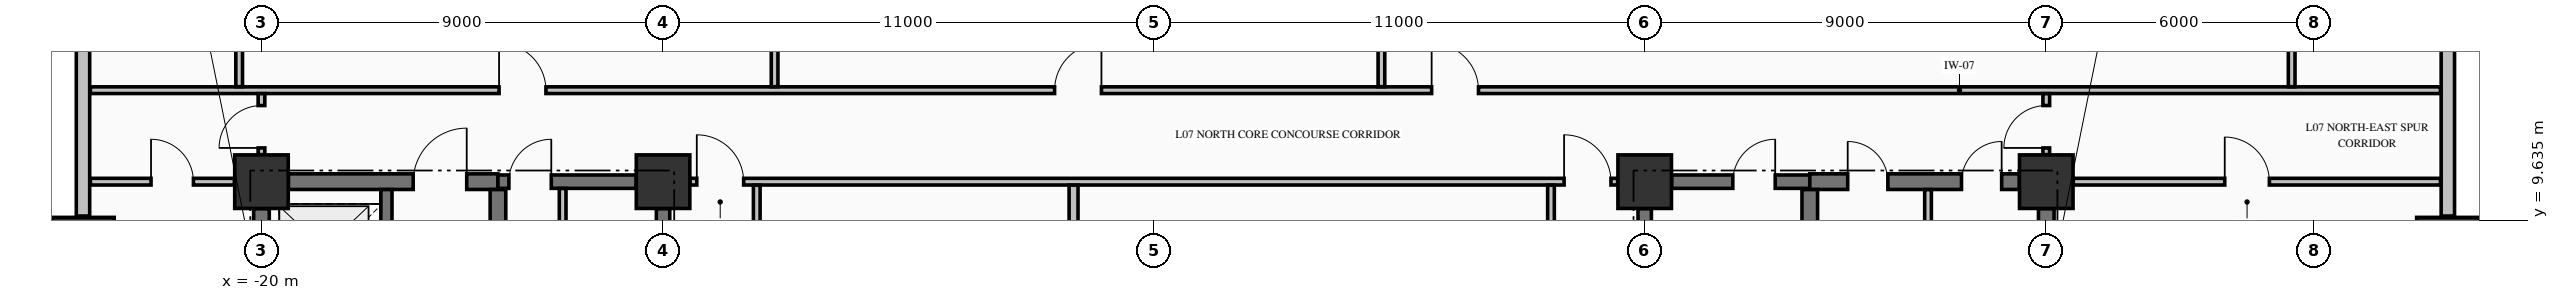
"""IFC4 building model, lengths in metres.
Left out: names, types, materials, properties, quantities, classifications, styles, units other than length and angle.
Written with IfcOpenShell. Run it as: python <this file> out.ifc"""

import sys

from ifc_helpers import new_model, si_unit, direction, frame, frame_2d, origin, origin_2d, place, context, subcontext, project, spatial, rectangle, extrude, element, fill, save


model = new_model("IFC4")
c1 = context("Model", 3, precision=1e-05, world=origin(), true_north=direction((0.0, 1.0)))
c2 = subcontext(c1, "Body", "Model", "MODEL_VIEW")
j1 = project(units=[si_unit("LENGTHUNIT", "METRE"), si_unit("PLANEANGLEUNIT", "RADIAN")], contexts=[c1])
p1 = place(None, origin())
s1 = spatial("IfcSite", under=j1, at=p1, CompositionType="ELEMENT")
p2 = place(p1, origin())
s2 = spatial("IfcBuilding", under=s1, at=p2, CompositionType="ELEMENT")
p3 = place(p2, frame((0.0, 0.0, 34.34)))
s3 = spatial("IfcBuildingStorey", under=s2, at=p3, CompositionType="ELEMENT", Elevation=34.34)
for number, where, z_axis, x_axis in (
    (1, (-24.0, 9.0, -0.3), (0.0, 0.0, 1.0), (1.0, 0.0, 0.0)),
    (2, (29.0, 9.0, -0.3), (0.0, 0.0, 1.0), (1.0, 0.0, 0.0)),
):
    element("IfcColumn", number, at=place(p3, frame(where, z_axis=z_axis, x_axis=x_axis)), inside=s3, PredefinedType="COLUMN", context=c2, shape_type="SweptSolid", body=[
        extrude(rectangle(XDim=1.4, YDim=1.4, at=origin_2d()), origin(), (0.0, 0.0, 1.0), 3.62),
    ])
for number, where, z_axis, x_axis in (
    (3, (-20.0, 10.5, -0.3), (0.0, 0.0, 1.0), (1.0, 0.0, 0.0)),
    (4, (-11.0, 10.5, -0.3), (0.0, 0.0, 1.0), (1.0, 0.0, 0.0)),
    (5, (11.0, 10.5, -0.3), (0.0, 0.0, 1.0), (1.0, 0.0, 0.0)),
    (6, (20.0, 10.5, -0.3), (0.0, 0.0, 1.0), (1.0, 0.0, 0.0)),
):
    element("IfcColumn", number, at=place(p3, frame(where, z_axis=z_axis, x_axis=x_axis)), inside=s3, PredefinedType="COLUMN", context=c2, shape_type="SweptSolid", body=[
        extrude(rectangle(XDim=1.2, YDim=1.2, at=origin_2d()), origin(), (0.0, 0.0, 1.0), 3.62),
    ])
for number, where, z_axis, x_axis in (
    (7, (29.0, 9.73, 0.0), (0.0, 0.0, 1.0), (0.0, 1.0, 0.0)),
    (8, (-24.0, 22.27, 0.0), (0.0, 0.0, 1.0), (0.0, -1.0, 0.0)),
):
    element("IfcWall", number, at=place(p3, frame(where, z_axis=z_axis, x_axis=x_axis)), inside=s3, PredefinedType="STANDARD", context=c2, shape_type="SweptSolid", body=[
        extrude(rectangle(XDim=12.54, YDim=0.3, at=frame_2d((6.27, 0.0))), origin(), (0.0, 0.0, 1.0), 2.712),
    ])
p4 = place(p3, frame((-19.396, 10.5, 0.0), z_axis=(0.0, 0.0, 1.0), x_axis=(1.0, 0.0, 0.0)))
e9 = element("IfcWall", 9, at=p4, inside=s3, PredefinedType="SHEAR", context=c2, shape_type="SweptSolid", body=[
    extrude(rectangle(XDim=4.696, YDim=0.35, at=frame_2d((2.348, 0.0))), origin(), (0.0, 0.0, 1.0), 3.32),
])
p5 = place(p4, frame((2.796, 0.0, 0.0)))
e10 = element("IfcOpeningElement", 10, at=p5, cuts=e9, PredefinedType="OPENING", context=c2, shape_type="SweptSolid", body=[
    extrude(rectangle(XDim=1.2, YDim=2.15, at=frame_2d((0.6, 1.075))), frame((0.0, 0.185, 0.0), z_axis=(0.0, -1.0, 0.0), x_axis=(1.0, 0.0, 0.0)), (0.0, 0.0, 1.0), 0.37),
])
p6 = place(p3, frame((-14.7, 10.5, 0.0), z_axis=(0.0, 0.0, 1.0), x_axis=(1.0, 0.0, 0.0)))
e11 = element("IfcWall", 11, at=p6, inside=s3, PredefinedType="SHEAR", context=c2, shape_type="SweptSolid", body=[
    extrude(rectangle(XDim=3.096, YDim=0.3, at=frame_2d((1.548, 0.0))), origin(), (0.0, 0.0, 1.0), 3.32),
])
p7 = place(p6, frame((0.245, 0.0, 0.0)))
e12 = element("IfcOpeningElement", 12, at=p7, cuts=e11, PredefinedType="OPENING", context=c2, shape_type="SweptSolid", body=[
    extrude(rectangle(XDim=0.95, YDim=2.15, at=frame_2d((0.475, 1.075))), frame((0.0, 0.16, 0.0), z_axis=(0.0, -1.0, 0.0), x_axis=(1.0, 0.0, 0.0)), (0.0, 0.0, 1.0), 0.32),
])
p8 = place(p3, frame((11.604, 10.5, 0.0), z_axis=(0.0, 0.0, 1.0), x_axis=(1.0, 0.0, 0.0)))
e13 = element("IfcWall", 13, at=p8, inside=s3, PredefinedType="SHEAR", context=c2, shape_type="SweptSolid", body=[
    extrude(rectangle(XDim=3.096, YDim=0.3, at=frame_2d((1.548, 0.0))), origin(), (0.0, 0.0, 1.0), 3.32),
])
p9 = place(p8, frame((1.371, 0.0, 0.0)))
e14 = element("IfcOpeningElement", 14, at=p9, cuts=e13, PredefinedType="OPENING", context=c2, shape_type="SweptSolid", body=[
    extrude(rectangle(XDim=0.95, YDim=2.15, at=frame_2d((0.475, 1.075))), frame((0.0, 0.16, 0.0), z_axis=(0.0, -1.0, 0.0), x_axis=(1.0, 0.0, 0.0)), (0.0, 0.0, 1.0), 0.32),
])
p10 = place(p3, frame((14.7, 10.5, 0.0), z_axis=(0.0, 0.0, 1.0), x_axis=(1.0, 0.0, 0.0)))
e15 = element("IfcWall", 15, at=p10, inside=s3, PredefinedType="SHEAR", context=c2, shape_type="SweptSolid", body=[
    extrude(rectangle(XDim=4.696, YDim=0.35, at=frame_2d((2.348, 0.0))), origin(), (0.0, 0.0, 1.0), 3.32),
])
p11 = place(p10, frame((0.85, 0.0, 0.0)))
e16 = element("IfcOpeningElement", 16, at=p11, cuts=e15, PredefinedType="OPENING", context=c2, shape_type="SweptSolid", body=[
    extrude(rectangle(XDim=0.9, YDim=2.15, at=frame_2d((0.45, 1.075))), frame((0.0, 0.185, 0.0), z_axis=(0.0, -1.0, 0.0), x_axis=(1.0, 0.0, 0.0)), (0.0, 0.0, 1.0), 0.37),
])
p12 = place(p10, frame((3.4, 0.0, 0.0)))
e17 = element("IfcOpeningElement", 17, at=p12, cuts=e15, PredefinedType="OPENING", context=c2, shape_type="SweptSolid", body=[
    extrude(rectangle(XDim=0.9, YDim=2.15, at=frame_2d((0.45, 1.075))), frame((0.0, 0.185, 0.0), z_axis=(0.0, -1.0, 0.0), x_axis=(1.0, 0.0, 0.0)), (0.0, 0.0, 1.0), 0.37),
])
p13 = place(p3, frame((-23.835, 10.5, 0.0), z_axis=(0.0, 0.0, 1.0), x_axis=(1.0, 0.0, 0.0)))
e18 = element("IfcWall", 18, at=p13, inside=s3, PredefinedType="PARTITIONING", context=c2, shape_type="SweptSolid", body=[
    extrude(rectangle(XDim=3.229, YDim=0.15, at=frame_2d((1.615, 0.0))), origin(), (0.0, 0.0, 1.0), 3.32),
])
p14 = place(p13, frame((1.36, 0.0, 0.0)))
e19 = element("IfcOpeningElement", 19, at=p14, cuts=e18, PredefinedType="OPENING", context=c2, shape_type="SweptSolid", body=[
    extrude(rectangle(XDim=0.95, YDim=2.15, at=frame_2d((0.475, 1.075))), frame((0.0, 0.085, 0.0), z_axis=(0.0, -1.0, 0.0), x_axis=(1.0, 0.0, 0.0)), (0.0, 0.0, 1.0), 0.17),
])
p15 = place(p3, frame((-10.394, 10.5, 0.0), z_axis=(0.0, 0.0, 1.0), x_axis=(1.0, 0.0, 0.0)))
e20 = element("IfcWall", 20, at=p15, inside=s3, PredefinedType="PARTITIONING", context=c2, shape_type="SweptSolid", body=[
    extrude(rectangle(XDim=20.788, YDim=0.15, at=frame_2d((10.394, 0.0))), origin(), (0.0, 0.0, 1.0), 3.32),
])
p16 = place(p15, frame((0.15, 0.0, 0.0)))
e21 = element("IfcOpeningElement", 21, at=p16, cuts=e20, PredefinedType="OPENING", context=c2, shape_type="SweptSolid", body=[
    extrude(rectangle(XDim=1.05, YDim=2.15, at=frame_2d((0.525, 1.075))), frame((0.0, 0.085, 0.0), z_axis=(0.0, -1.0, 0.0), x_axis=(1.0, 0.0, 0.0)), (0.0, 0.0, 1.0), 0.17),
])
p17 = place(p15, frame((19.588, 0.0, 0.0)))
e22 = element("IfcOpeningElement", 22, at=p17, cuts=e20, PredefinedType="OPENING", context=c2, shape_type="SweptSolid", body=[
    extrude(rectangle(XDim=1.05, YDim=2.15, at=frame_2d((0.525, 1.075))), frame((0.0, 0.085, 0.0), z_axis=(0.0, -1.0, 0.0), x_axis=(1.0, 0.0, 0.0)), (0.0, 0.0, 1.0), 0.17),
])
p18 = place(p3, frame((20.606, 10.5, 0.0), z_axis=(0.0, 0.0, 1.0), x_axis=(1.0, 0.0, 0.0)))
e23 = element("IfcWall", 23, at=p18, inside=s3, PredefinedType="PARTITIONING", context=c2, shape_type="SweptSolid", body=[
    extrude(rectangle(XDim=8.229, YDim=0.15, at=frame_2d((4.115, 0.0))), origin(), (0.0, 0.0, 1.0), 3.32),
])
p19 = place(p18, frame((3.394, 0.0, 0.0)))
e24 = element("IfcOpeningElement", 24, at=p19, cuts=e23, PredefinedType="OPENING", context=c2, shape_type="SweptSolid", body=[
    extrude(rectangle(XDim=1.0, YDim=2.15, at=frame_2d((0.5, 1.075))), frame((0.0, 0.085, 0.0), z_axis=(0.0, -1.0, 0.0), x_axis=(1.0, 0.0, 0.0)), (0.0, 0.0, 1.0), 0.17),
])
p20 = place(p3, frame((-23.835, 12.55, 0.0), z_axis=(0.0, 0.0, 1.0), x_axis=(1.0, 0.0, 0.0)))
e25 = element("IfcWall", 25, at=p20, inside=s3, PredefinedType="PARTITIONING", context=c2, shape_type="SweptSolid", body=[
    extrude(rectangle(XDim=52.67, YDim=0.15, at=frame_2d((26.335, 0.0))), origin(), (0.0, 0.0, 1.0), 3.32),
])
p21 = place(p20, frame((9.16, 0.0, 0.0)))
e26 = element("IfcOpeningElement", 26, at=p21, cuts=e25, PredefinedType="OPENING", context=c2, shape_type="SweptSolid", body=[
    extrude(rectangle(XDim=1.05, YDim=2.15, at=frame_2d((0.525, 1.075))), frame((0.0, 0.085, 0.0), z_axis=(0.0, -1.0, 0.0), x_axis=(1.0, 0.0, 0.0)), (0.0, 0.0, 1.0), 0.17),
])
p22 = place(p20, frame((21.61, 0.0, 0.0)))
e27 = element("IfcOpeningElement", 27, at=p22, cuts=e25, PredefinedType="OPENING", context=c2, shape_type="SweptSolid", body=[
    extrude(rectangle(XDim=1.05, YDim=2.15, at=frame_2d((0.525, 1.075))), frame((0.0, 0.085, 0.0), z_axis=(0.0, -1.0, 0.0), x_axis=(1.0, 0.0, 0.0)), (0.0, 0.0, 1.0), 0.17),
])
p23 = place(p20, frame((30.06, 0.0, 0.0)))
e28 = element("IfcOpeningElement", 28, at=p23, cuts=e25, PredefinedType="OPENING", context=c2, shape_type="SweptSolid", body=[
    extrude(rectangle(XDim=1.05, YDim=2.15, at=frame_2d((0.525, 1.075))), frame((0.0, 0.085, 0.0), z_axis=(0.0, -1.0, 0.0), x_axis=(1.0, 0.0, 0.0)), (0.0, 0.0, 1.0), 0.17),
])
p24 = place(p3, frame((-20.0, 7.727, 0.0), z_axis=(0.0, 0.0, 1.0), x_axis=(0.0, 1.0, 0.0)))
e29 = element("IfcWall", 29, at=p24, inside=s3, PredefinedType="SHEAR", context=c2, shape_type="SweptSolid", body=[
    extrude(rectangle(XDim=2.169, YDim=0.35, at=frame_2d((1.084, 0.0))), origin(), (0.0, 0.0, 1.0), 3.32),
])
p25 = place(p3, frame((-17.2, 7.727, 0.0), z_axis=(0.0, 0.0, 1.0), x_axis=(0.0, 1.0, 0.0)))
e30 = element("IfcWall", 30, at=p25, inside=s3, PredefinedType="SOLIDWALL", context=c2, shape_type="SweptSolid", body=[
    extrude(rectangle(XDim=2.596, YDim=0.25, at=frame_2d((1.298, 0.0))), origin(), (0.0, 0.0, 1.0), 3.32),
])
p26 = place(p25, frame((0.773, 0.0, 0.0)))
e31 = element("IfcOpeningElement", 31, at=p26, cuts=e30, PredefinedType="OPENING", context=c2, shape_type="SweptSolid", body=[
    extrude(rectangle(XDim=1.1, YDim=2.2, at=frame_2d((0.55, 1.1))), frame((0.0, 0.135, 0.0), z_axis=(0.0, -1.0, 0.0), x_axis=(1.0, 0.0, 0.0)), (0.0, 0.0, 1.0), 0.27),
])
p27 = place(p3, frame((-14.7, 5.852, 0.0), z_axis=(0.0, 0.0, 1.0), x_axis=(0.0, 1.0, 0.0)))
e32 = element("IfcWall", 32, at=p27, inside=s3, PredefinedType="SHEAR", context=c2, shape_type="SweptSolid", body=[
    extrude(rectangle(XDim=4.471, YDim=0.35, at=frame_2d((2.235, 0.0))), origin(), (0.0, 0.0, 1.0), 3.32),
])
for number, where, z_axis, x_axis in (
    (33, (-11.0, 5.852, 0.0), (0.0, 0.0, 1.0), (0.0, 1.0, 0.0)),
    (34, (11.0, 5.852, 0.0), (0.0, 0.0, 1.0), (0.0, 1.0, 0.0)),
):
    element("IfcWall", number, at=place(p3, frame(where, z_axis=z_axis, x_axis=x_axis)), inside=s3, PredefinedType="SHEAR", context=c2, shape_type="SweptSolid", body=[
        extrude(rectangle(XDim=4.044, YDim=0.3, at=frame_2d((2.022, 0.0))), origin(), (0.0, 0.0, 1.0), 3.32),
    ])
p28 = place(p3, frame((14.7, 5.852, 0.0), z_axis=(0.0, 0.0, 1.0), x_axis=(0.0, 1.0, 0.0)))
e35 = element("IfcWall", 35, at=p28, inside=s3, PredefinedType="SHEAR", context=c2, shape_type="SweptSolid", body=[
    extrude(rectangle(XDim=4.471, YDim=0.35, at=frame_2d((2.235, 0.0))), origin(), (0.0, 0.0, 1.0), 3.32),
])
p29 = place(p3, frame((20.0, 0.604, 0.0), z_axis=(0.0, 0.0, 1.0), x_axis=(0.0, 1.0, 0.0)))
e36 = element("IfcWall", 36, at=p29, inside=s3, PredefinedType="SHEAR", context=c2, shape_type="SweptSolid", body=[
    extrude(rectangle(XDim=9.292, YDim=0.35, at=frame_2d((4.646, 0.0))), origin(), (0.0, 0.0, 1.0), 3.32),
])
p30 = place(p3, frame((-20.5, 12.628, 0.0), z_axis=(0.0, 0.0, 1.0), x_axis=(0.0, 1.0, 0.0)))
e37 = element("IfcWall", 37, at=p30, inside=s3, PredefinedType="PARTITIONING", context=c2, shape_type="SweptSolid", body=[
    extrude(rectangle(XDim=9.666, YDim=0.15, at=frame_2d((4.833, 0.0))), origin(), (0.0, 0.0, 1.0), 3.32),
])
p31 = place(p3, frame((-20.0, 11.106, 0.0), z_axis=(0.0, 0.0, 1.0), x_axis=(0.0, 1.0, 0.0)))
e38 = element("IfcWall", 38, at=p31, inside=s3, PredefinedType="PARTITIONING", context=c2, shape_type="SweptSolid", body=[
    extrude(rectangle(XDim=1.366, YDim=0.15, at=frame_2d((0.683, 0.0))), origin(), (0.0, 0.0, 1.0), 3.32),
])
p32 = place(p31, frame((0.15, 0.0, 0.0)))
e39 = element("IfcOpeningElement", 39, at=p32, cuts=e38, PredefinedType="OPENING", context=c2, shape_type="SweptSolid", body=[
    extrude(rectangle(XDim=0.95, YDim=2.15, at=frame_2d((0.475, 1.075))), frame((0.0, 0.085, 0.0), z_axis=(0.0, -1.0, 0.0), x_axis=(1.0, 0.0, 0.0)), (0.0, 0.0, 1.0), 0.17),
])
p33 = place(p3, frame((-13.25, 5.853, 0.0), z_axis=(0.0, 0.0, 1.0), x_axis=(0.0, 1.0, 0.0)))
e40 = element("IfcWall", 40, at=p33, inside=s3, PredefinedType="PARTITIONING", context=c2, shape_type="SweptSolid", body=[
    extrude(rectangle(XDim=4.494, YDim=0.15, at=frame_2d((2.247, 0.0))), origin(), (0.0, 0.0, 1.0), 3.32),
])
p34 = place(p33, frame((1.472, 0.0, 0.0)))
e41 = element("IfcOpeningElement", 41, at=p34, cuts=e40, PredefinedType="OPENING", context=c2, shape_type="SweptSolid", body=[
    extrude(rectangle(XDim=0.95, YDim=2.15, at=frame_2d((0.475, 1.075))), frame((0.0, 0.085, 0.0), z_axis=(0.0, -1.0, 0.0), x_axis=(1.0, 0.0, 0.0)), (0.0, 0.0, 1.0), 0.17),
])
p35 = place(p3, frame((-8.9, -3.097, 0.0), z_axis=(0.0, 0.0, 1.0), x_axis=(0.0, 1.0, 0.0)))
e42 = element("IfcWall", 42, at=p35, inside=s3, PredefinedType="PARTITIONING", context=c2, shape_type="SweptSolid", body=[
    extrude(rectangle(XDim=13.519, YDim=0.15, at=frame_2d((6.76, 0.0))), origin(), (0.0, 0.0, 1.0), 3.32),
])
p36 = place(p35, frame((6.222, 0.0, 0.0)))
e43 = element("IfcOpeningElement", 43, at=p36, cuts=e42, PredefinedType="OPENING", context=c2, shape_type="SweptSolid", body=[
    extrude(rectangle(XDim=1.05, YDim=2.15, at=frame_2d((0.525, 1.075))), frame((0.0, 0.085, 0.0), z_axis=(0.0, -1.0, 0.0), x_axis=(1.0, 0.0, 0.0)), (0.0, 0.0, 1.0), 0.17),
])
p37 = place(p3, frame((-8.5, 12.628, 0.0), z_axis=(0.0, 0.0, 1.0), x_axis=(0.0, 1.0, 0.0)))
e44 = element("IfcWall", 44, at=p37, inside=s3, PredefinedType="PARTITIONING", context=c2, shape_type="SweptSolid", body=[
    extrude(rectangle(XDim=13.707, YDim=0.15, at=frame_2d((6.854, 0.0))), origin(), (0.0, 0.0, 1.0), 3.32),
])
p38 = place(p3, frame((-1.8, -1.097, 0.0), z_axis=(0.0, 0.0, 1.0), x_axis=(0.0, 1.0, 0.0)))
e45 = element("IfcWall", 45, at=p38, inside=s3, PredefinedType="PARTITIONING", context=c2, shape_type="SweptSolid", body=[
    extrude(rectangle(XDim=11.519, YDim=0.2, at=frame_2d((5.76, 0.0))), origin(), (0.0, 0.0, 1.0), 3.32),
])
p39 = place(p3, frame((5.1, 12.628, 0.0), z_axis=(0.0, 0.0, 1.0), x_axis=(0.0, 1.0, 0.0)))
e46 = element("IfcWall", 46, at=p39, inside=s3, PredefinedType="PARTITIONING", context=c2, shape_type="SweptSolid", body=[
    extrude(rectangle(XDim=13.707, YDim=0.15, at=frame_2d((6.854, 0.0))), origin(), (0.0, 0.0, 1.0), 3.32),
])
p40 = place(p3, frame((8.9, -1.097, 0.0), z_axis=(0.0, 0.0, 1.0), x_axis=(0.0, 1.0, 0.0)))
e47 = element("IfcWall", 47, at=p40, inside=s3, PredefinedType="PARTITIONING", context=c2, shape_type="SweptSolid", body=[
    extrude(rectangle(XDim=11.519, YDim=0.15, at=frame_2d((5.76, 0.0))), origin(), (0.0, 0.0, 1.0), 3.32),
])
p41 = place(p40, frame((5.197, 0.0, 0.0)))
e48 = element("IfcOpeningElement", 48, at=p41, cuts=e47, PredefinedType="OPENING", context=c2, shape_type="SweptSolid", body=[
    extrude(rectangle(XDim=1.1, YDim=2.15, at=frame_2d((0.55, 1.075))), frame((0.0, 0.085, 0.0), z_axis=(0.0, -1.0, 0.0), x_axis=(1.0, 0.0, 0.0)), (0.0, 0.0, 1.0), 0.17),
])
p42 = place(p3, frame((17.35, -4.422, 0.0), z_axis=(0.0, 0.0, 1.0), x_axis=(0.0, 1.0, 0.0)))
e49 = element("IfcWall", 49, at=p42, inside=s3, PredefinedType="PARTITIONING", context=c2, shape_type="SweptSolid", body=[
    extrude(rectangle(XDim=14.744, YDim=0.15, at=frame_2d((7.372, 0.0))), origin(), (0.0, 0.0, 1.0), 3.32),
])
p43 = place(p3, frame((20.0, 11.106, 0.0), z_axis=(0.0, 0.0, 1.0), x_axis=(0.0, 1.0, 0.0)))
e50 = element("IfcWall", 50, at=p43, inside=s3, PredefinedType="PARTITIONING", context=c2, shape_type="SweptSolid", body=[
    extrude(rectangle(XDim=1.366, YDim=0.15, at=frame_2d((0.683, 0.0))), origin(), (0.0, 0.0, 1.0), 2.66),
])
p44 = place(p43, frame((0.15, 0.0, 0.0)))
e51 = element("IfcOpeningElement", 51, at=p44, cuts=e50, PredefinedType="OPENING", context=c2, shape_type="SweptSolid", body=[
    extrude(rectangle(XDim=0.95, YDim=2.15, at=frame_2d((0.475, 1.075))), frame((0.0, 0.085, 0.0), z_axis=(0.0, -1.0, 0.0), x_axis=(1.0, 0.0, 0.0)), (0.0, 0.0, 1.0), 0.17),
])
p45 = place(p3, frame((25.5, 12.628, 0.0), z_axis=(0.0, 0.0, 1.0), x_axis=(0.0, 1.0, 0.0)))
e52 = element("IfcWall", 52, at=p45, inside=s3, PredefinedType="PARTITIONING", context=c2, shape_type="SweptSolid", body=[
    extrude(rectangle(XDim=9.666, YDim=0.15, at=frame_2d((4.833, 0.0))), origin(), (0.0, 0.0, 1.0), 3.32),
])
p46 = place(p7, origin())
e53 = element("IfcDoor", 53, at=p46, inside=s3, OperationType="SINGLE_SWING_RIGHT", PredefinedType="DOOR", context=c2, shape_type="SweptSolid", body=[
    extrude(rectangle(XDim=0.95, YDim=2.15, at=frame_2d((0.475, 1.075))), frame((0.0, 0.025, 0.0), z_axis=(0.0, -1.0, 0.0), x_axis=(1.0, 0.0, 0.0)), (0.0, 0.0, 1.0), 0.05),
])
fill(e12, e53)
p47 = place(p9, origin())
e54 = element("IfcDoor", 54, at=p47, inside=s3, OperationType="SINGLE_SWING_RIGHT", PredefinedType="DOOR", context=c2, shape_type="SweptSolid", body=[
    extrude(rectangle(XDim=0.95, YDim=2.15, at=frame_2d((0.475, 1.075))), frame((0.0, 0.025, 0.0), z_axis=(0.0, -1.0, 0.0), x_axis=(1.0, 0.0, 0.0)), (0.0, 0.0, 1.0), 0.05),
])
fill(e14, e54)
p48 = place(p5, origin())
e55 = element("IfcDoor", 55, at=p48, inside=s3, OperationType="SINGLE_SWING_RIGHT", PredefinedType="DOOR", context=c2, shape_type="SweptSolid", body=[
    extrude(rectangle(XDim=1.2, YDim=2.15, at=frame_2d((0.6, 1.075))), frame((0.0, 0.025, 0.0), z_axis=(0.0, -1.0, 0.0), x_axis=(1.0, 0.0, 0.0)), (0.0, 0.0, 1.0), 0.05),
])
fill(e10, e55)
p49 = place(p11, origin())
e56 = element("IfcDoor", 56, at=p49, inside=s3, OperationType="SINGLE_SWING_LEFT", PredefinedType="DOOR", context=c2, shape_type="SweptSolid", body=[
    extrude(rectangle(XDim=0.9, YDim=2.15, at=frame_2d((0.45, 1.075))), frame((0.0, 0.025, 0.0), z_axis=(0.0, -1.0, 0.0), x_axis=(1.0, 0.0, 0.0)), (0.0, 0.0, 1.0), 0.05),
])
fill(e16, e56)
p50 = place(p12, origin())
e57 = element("IfcDoor", 57, at=p50, inside=s3, OperationType="SINGLE_SWING_RIGHT", PredefinedType="DOOR", context=c2, shape_type="SweptSolid", body=[
    extrude(rectangle(XDim=0.9, YDim=2.15, at=frame_2d((0.45, 1.075))), frame((0.0, 0.025, 0.0), z_axis=(0.0, -1.0, 0.0), x_axis=(1.0, 0.0, 0.0)), (0.0, 0.0, 1.0), 0.05),
])
fill(e17, e57)
p51 = place(p16, origin())
e58 = element("IfcDoor", 58, at=p51, inside=s3, OperationType="SINGLE_SWING_LEFT", PredefinedType="DOOR", context=c2, shape_type="SweptSolid", body=[
    extrude(rectangle(XDim=1.05, YDim=2.15, at=frame_2d((0.525, 1.075))), frame((0.0, 0.025, 0.0), z_axis=(0.0, -1.0, 0.0), x_axis=(1.0, 0.0, 0.0)), (0.0, 0.0, 1.0), 0.05),
])
fill(e21, e58)
p52 = place(p17, origin())
e59 = element("IfcDoor", 59, at=p52, inside=s3, OperationType="SINGLE_SWING_LEFT", PredefinedType="DOOR", context=c2, shape_type="SweptSolid", body=[
    extrude(rectangle(XDim=1.05, YDim=2.15, at=frame_2d((0.525, 1.075))), frame((0.0, 0.025, 0.0), z_axis=(0.0, -1.0, 0.0), x_axis=(1.0, 0.0, 0.0)), (0.0, 0.0, 1.0), 0.05),
])
fill(e22, e59)
p53 = place(p21, origin())
e60 = element("IfcDoor", 60, at=p53, inside=s3, OperationType="SINGLE_SWING_LEFT", PredefinedType="DOOR", context=c2, shape_type="SweptSolid", body=[
    extrude(rectangle(XDim=1.05, YDim=2.15, at=frame_2d((0.525, 1.075))), frame((0.0, 0.025, 0.0), z_axis=(0.0, -1.0, 0.0), x_axis=(1.0, 0.0, 0.0)), (0.0, 0.0, 1.0), 0.05),
])
fill(e26, e60)
p54 = place(p22, origin())
e61 = element("IfcDoor", 61, at=p54, inside=s3, OperationType="SINGLE_SWING_RIGHT", PredefinedType="DOOR", context=c2, shape_type="SweptSolid", body=[
    extrude(rectangle(XDim=1.05, YDim=2.15, at=frame_2d((0.525, 1.075))), frame((0.0, 0.025, 0.0), z_axis=(0.0, -1.0, 0.0), x_axis=(1.0, 0.0, 0.0)), (0.0, 0.0, 1.0), 0.05),
])
fill(e27, e61)
p55 = place(p23, origin())
e62 = element("IfcDoor", 62, at=p55, inside=s3, OperationType="SINGLE_SWING_LEFT", PredefinedType="DOOR", context=c2, shape_type="SweptSolid", body=[
    extrude(rectangle(XDim=1.05, YDim=2.15, at=frame_2d((0.525, 1.075))), frame((0.0, 0.025, 0.0), z_axis=(0.0, -1.0, 0.0), x_axis=(1.0, 0.0, 0.0)), (0.0, 0.0, 1.0), 0.05),
])
fill(e28, e62)
p56 = place(p32, origin())
e63 = element("IfcDoor", 63, at=p56, inside=s3, OperationType="SINGLE_SWING_LEFT", PredefinedType="DOOR", context=c2, shape_type="SweptSolid", body=[
    extrude(rectangle(XDim=0.95, YDim=2.15, at=frame_2d((0.475, 1.075))), frame((0.0, 0.025, 0.0), z_axis=(0.0, -1.0, 0.0), x_axis=(1.0, 0.0, 0.0)), (0.0, 0.0, 1.0), 0.05),
])
fill(e39, e63)
p57 = place(p14, origin())
e64 = element("IfcDoor", 64, at=p57, inside=s3, OperationType="SINGLE_SWING_LEFT", PredefinedType="DOOR", context=c2, shape_type="SweptSolid", body=[
    extrude(rectangle(XDim=0.95, YDim=2.15, at=frame_2d((0.475, 1.075))), frame((0.0, 0.025, 0.0), z_axis=(0.0, -1.0, 0.0), x_axis=(1.0, 0.0, 0.0)), (0.0, 0.0, 1.0), 0.05),
])
fill(e19, e64)
p58 = place(p44, origin())
e65 = element("IfcDoor", 65, at=p58, inside=s3, OperationType="SINGLE_SWING_LEFT", PredefinedType="DOOR", context=c2, shape_type="SweptSolid", body=[
    extrude(rectangle(XDim=0.95, YDim=2.15, at=frame_2d((0.475, 1.075))), frame((0.0, 0.025, 0.0), z_axis=(0.0, -1.0, 0.0), x_axis=(1.0, 0.0, 0.0)), (0.0, 0.0, 1.0), 0.05),
])
fill(e51, e65)
p59 = place(p19, origin())
e66 = element("IfcDoor", 66, at=p59, inside=s3, OperationType="SINGLE_SWING_LEFT", PredefinedType="DOOR", context=c2, shape_type="SweptSolid", body=[
    extrude(rectangle(XDim=1.0, YDim=2.15, at=frame_2d((0.5, 1.075))), frame((0.0, 0.025, 0.0), z_axis=(0.0, -1.0, 0.0), x_axis=(1.0, 0.0, 0.0)), (0.0, 0.0, 1.0), 0.05),
])
fill(e24, e66)
save(model, sys.argv[1])
